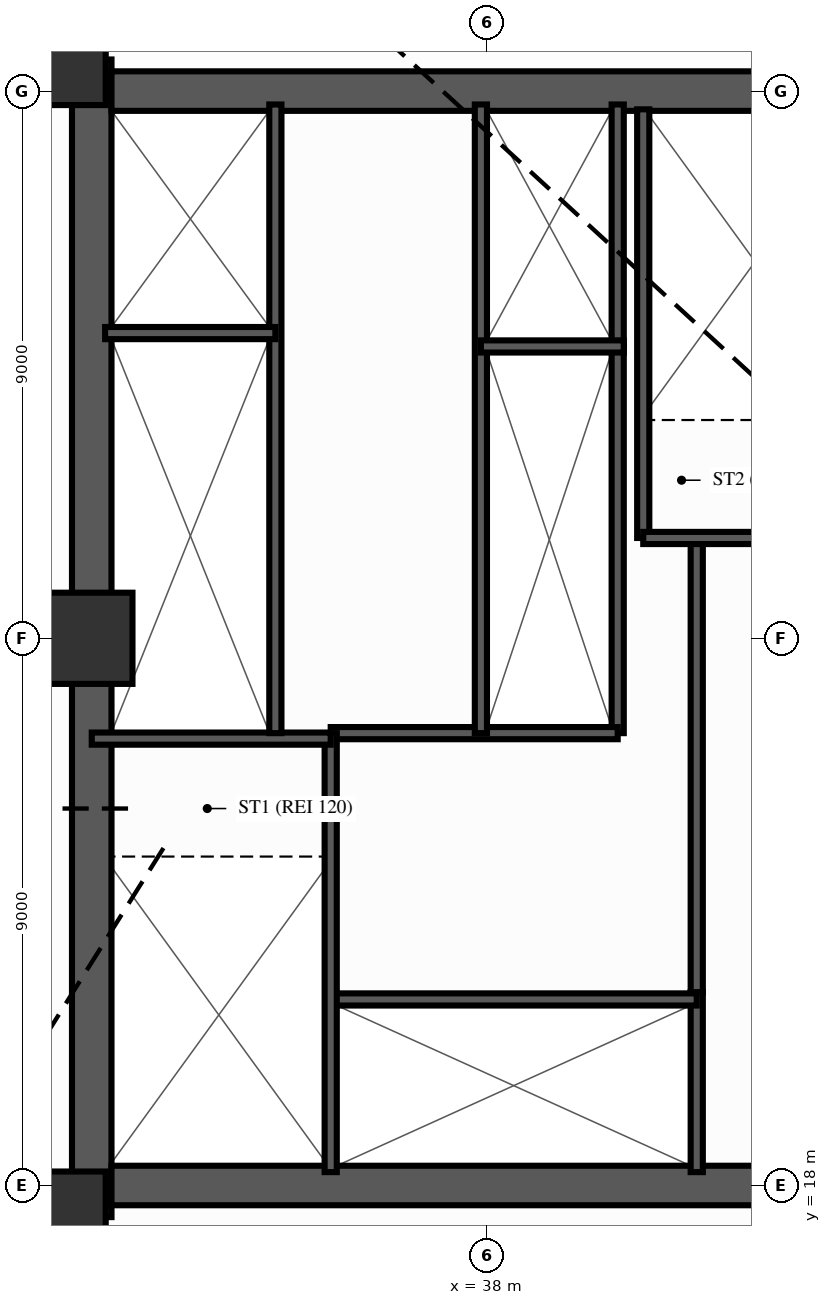
"""IFC4 building model, lengths in metres.
Left out: names, types, materials, properties, quantities, classifications, styles, units other than length and angle.
Written with IfcOpenShell. Run it as: python <this file> out.ifc"""

import sys

from ifc_helpers import new_model, si_unit, direction, frame, frame_2d, origin, origin_2d, place, context, subcontext, project, spatial, rectangle, extrude, source, transform, mapped, element, fill, save


model = new_model("IFC4")
c1 = context("Model", 3, precision=1e-05, world=origin(), true_north=direction((0.0, 1.0)))
c2 = subcontext(c1, "Body", "Model", "MODEL_VIEW")
j1 = project(units=[si_unit("LENGTHUNIT", "METRE"), si_unit("PLANEANGLEUNIT", "RADIAN")], contexts=[c1])
p1 = place(None, origin())
s1 = spatial("IfcSite", under=j1, at=p1, CompositionType="ELEMENT")
p2 = place(p1, origin())
s2 = spatial("IfcBuilding", under=s1, at=p2, CompositionType="ELEMENT")
p3 = place(p2, origin())
s3 = spatial("IfcBuildingStorey", under=s2, at=p3, CompositionType="ELEMENT", Elevation=0.0)
p4 = place(p3, frame((31.5, 17.48, 0.0), z_axis=(0.0, 0.0, 1.0), x_axis=(0.0, 1.0, 0.0)))
e1 = element("IfcWall", 1, at=p4, inside=s3, PredefinedType="SHEAR", context=c2, shape_type="SweptSolid", body=[
    extrude(rectangle(XDim=19.04, YDim=0.65, at=frame_2d((9.52, 0.0))), origin(), (0.0, 0.0, 1.0), 4.2),
])
p5 = place(p4, frame((6.32, 0.0, 0.0)))
e2 = element("IfcOpeningElement", 2, at=p5, cuts=e1, PredefinedType="OPENING", context=c2, shape_type="SweptSolid", body=[
    extrude(rectangle(XDim=1.1, YDim=2.15, at=frame_2d((0.55, 1.075))), frame((0.0, 0.337, 0.0), z_axis=(0.0, -1.0, 0.0), x_axis=(1.0, 0.0, 0.0)), (0.0, 0.0, 1.0), 0.674),
])
p6 = place(p3, frame((31.825, 18.0, 0.0), z_axis=(0.0, 0.0, 1.0), x_axis=(1.0, 0.0, 0.0)))
e3 = element("IfcWall", 3, at=p6, inside=s3, PredefinedType="SHEAR", context=c2, shape_type="SweptSolid", body=[
    extrude(rectangle(XDim=12.35, YDim=0.65, at=frame_2d((6.175, 0.0))), origin(), (0.0, 0.0, 1.0), 4.2),
])
p7 = place(p3, frame((31.825, 36.0, 0.0), z_axis=(0.0, 0.0, 1.0), x_axis=(1.0, 0.0, 0.0)))
e4 = element("IfcWall", 4, at=p7, inside=s3, PredefinedType="SHEAR", context=c2, shape_type="SweptSolid", body=[
    extrude(rectangle(XDim=12.35, YDim=0.65, at=frame_2d((6.175, 0.0))), origin(), (0.0, 0.0, 1.0), 4.2),
])
p8 = place(p7, frame((5.125, 0.0, 0.0), z_axis=(0.0, 0.0, 1.0), x_axis=(-1.0, 0.0, 0.0)))
e5 = element("IfcOpeningElement", 5, at=p8, cuts=e4, PredefinedType="OPENING", context=c2, shape_type="SweptSolid", body=[
    extrude(rectangle(XDim=1.4, YDim=2.15, at=frame_2d((0.7, 1.075))), frame((0.0, 0.337, 0.0), z_axis=(0.0, -1.0, 0.0), x_axis=(1.0, 0.0, 0.0)), (0.0, 0.0, 1.0), 0.674),
])
m1 = source(origin(), c2, "Body", "SweptSolid", [
    extrude(rectangle(XDim=1.5, YDim=1.5, at=origin_2d()), origin(), (0.0, 0.0, 1.0), 4.2),
])
for number, where, z_axis, x_axis in (
    (6, (30.98, 17.48, 0.0), (0.0, 0.0, 1.0), (1.0, 0.0, 0.0)),
    (7, (30.98, 36.52, 0.0), (0.0, 0.0, 1.0), (1.0, 0.0, 0.0)),
    (8, (31.42, 27.0, 0.0), (0.0, 0.0, 1.0), (1.0, 0.0, 0.0)),
):
    element("IfcColumn", number, at=place(p3, frame(where, z_axis=z_axis, x_axis=x_axis)), inside=s3, PredefinedType="COLUMN", context=c2, shape_type="MappedRepresentation", body=[
        mapped(m1, transform((0.0, 0.0, 0.0), scale=1.0)),
    ])
p9 = place(p3, frame((41.45, 18.22, 0.0), z_axis=(0.0, 0.0, 1.0), x_axis=(0.0, 1.0, 0.0)))
e9 = element("IfcWall", 9, at=p9, inside=s3, PredefinedType="PARTITIONING", context=c2, shape_type="SweptSolid", body=[
    extrude(rectangle(XDim=2.96, YDim=0.2, at=frame_2d((1.48, 0.0))), origin(), (0.0, 0.0, 1.0), 3.92),
])
p10 = place(p3, frame((41.45, 21.18, 0.0), z_axis=(0.0, 0.0, 1.0), x_axis=(0.0, 1.0, 0.0)))
e10 = element("IfcWall", 10, at=p10, inside=s3, PredefinedType="PARTITIONING", context=c2, shape_type="SweptSolid", body=[
    extrude(rectangle(XDim=7.42, YDim=0.2, at=frame_2d((3.71, 0.0))), origin(), (0.0, 0.0, 1.0), 3.92),
])
p11 = place(p10, frame((2.6, 0.0, 0.0)))
e11 = element("IfcOpeningElement", 11, at=p11, cuts=e10, PredefinedType="OPENING", context=c2, shape_type="SweptSolid", body=[
    extrude(rectangle(XDim=0.9, YDim=2.1, at=frame_2d((0.45, 1.05))), frame((0.0, 0.112, 0.0), z_axis=(0.0, -1.0, 0.0), x_axis=(1.0, 0.0, 0.0)), (0.0, 0.0, 1.0), 0.224),
])
p12 = place(p3, frame((40.15, 25.44, 0.0), z_axis=(0.0, 0.0, 1.0), x_axis=(0.0, 1.0, 0.0)))
e12 = element("IfcWall", 12, at=p12, inside=s3, PredefinedType="PARTITIONING", context=c2, shape_type="SweptSolid", body=[
    extrude(rectangle(XDim=6.36, YDim=0.2, at=frame_2d((3.18, 0.0))), origin(), (0.0, 0.0, 1.0), 3.92),
])
p13 = place(p3, frame((40.15, 31.8, 0.0), z_axis=(0.0, 0.0, 1.0), x_axis=(0.0, 1.0, 0.0)))
e13 = element("IfcWall", 13, at=p13, inside=s3, PredefinedType="PARTITIONING", context=c2, shape_type="SweptSolid", body=[
    extrude(rectangle(XDim=3.98, YDim=0.2, at=frame_2d((1.99, 0.0))), origin(), (0.0, 0.0, 1.0), 3.92),
])
p14 = place(p3, frame((35.43, 21.06, 0.0), z_axis=(0.0, 0.0, 1.0), x_axis=(1.0, 0.0, 0.0)))
e14 = element("IfcWall", 14, at=p14, inside=s3, PredefinedType="PARTITIONING", context=c2, shape_type="SweptSolid", body=[
    extrude(rectangle(XDim=6.02, YDim=0.2, at=frame_2d((3.01, 0.0))), origin(), (0.0, 0.0, 1.0), 3.92),
])
p15 = place(p14, frame((1.0, 0.0, 0.0)))
e15 = element("IfcOpeningElement", 15, at=p15, cuts=e14, PredefinedType="OPENING", context=c2, shape_type="SweptSolid", body=[
    extrude(rectangle(XDim=1.1, YDim=2.15, at=frame_2d((0.55, 1.075))), frame((0.0, 0.112, 0.0), z_axis=(0.0, -1.0, 0.0), x_axis=(1.0, 0.0, 0.0)), (0.0, 0.0, 1.0), 0.224),
])
p16 = place(p14, frame((2.95, 0.0, 0.0)))
e16 = element("IfcOpeningElement", 16, at=p16, cuts=e14, PredefinedType="OPENING", context=c2, shape_type="SweptSolid", body=[
    extrude(rectangle(XDim=1.1, YDim=2.15, at=frame_2d((0.55, 1.075))), frame((0.0, 0.112, 0.0), z_axis=(0.0, -1.0, 0.0), x_axis=(1.0, 0.0, 0.0)), (0.0, 0.0, 1.0), 0.224),
])
p17 = place(p14, frame((4.58, 0.0, 0.0)))
e17 = element("IfcOpeningElement", 17, at=p17, cuts=e14, PredefinedType="OPENING", context=c2, shape_type="SweptSolid", body=[
    extrude(rectangle(XDim=1.2, YDim=2.15, at=frame_2d((0.6, 1.075))), frame((0.0, 0.112, 0.0), z_axis=(0.0, -1.0, 0.0), x_axis=(1.0, 0.0, 0.0)), (0.0, 0.0, 1.0), 0.224),
])
p18 = place(p3, frame((35.43, 25.44, 0.0), z_axis=(0.0, 0.0, 1.0), x_axis=(1.0, 0.0, 0.0)))
e18 = element("IfcWall", 18, at=p18, inside=s3, PredefinedType="PARTITIONING", context=c2, shape_type="SweptSolid", body=[
    extrude(rectangle(XDim=4.72, YDim=0.2, at=frame_2d((2.36, 0.0))), origin(), (0.0, 0.0, 1.0), 3.92),
])
p19 = place(p18, frame((1.25, 0.0, 0.0)))
e19 = element("IfcOpeningElement", 19, at=p19, cuts=e18, PredefinedType="OPENING", context=c2, shape_type="SweptSolid", body=[
    extrude(rectangle(XDim=1.1, YDim=2.15, at=frame_2d((0.55, 1.075))), frame((0.0, 0.112, 0.0), z_axis=(0.0, -1.0, 0.0), x_axis=(1.0, 0.0, 0.0)), (0.0, 0.0, 1.0), 0.224),
])
p20 = place(p3, frame((35.43, 18.22, 0.0), z_axis=(0.0, 0.0, 1.0), x_axis=(0.0, 1.0, 0.0)))
e20 = element("IfcWall", 20, at=p20, inside=s3, PredefinedType="SOLIDWALL", context=c2, shape_type="SweptSolid", body=[
    extrude(rectangle(XDim=7.22, YDim=0.2, at=frame_2d((3.61, 0.0))), origin(), (0.0, 0.0, 1.0), 3.92),
])
p21 = place(p20, frame((6.68, 0.0, 0.0), z_axis=(0.0, 0.0, 1.0), x_axis=(-1.0, 0.0, 0.0)))
e21 = element("IfcOpeningElement", 21, at=p21, cuts=e20, PredefinedType="OPENING", context=c2, shape_type="SweptSolid", body=[
    extrude(rectangle(XDim=1.1, YDim=2.15, at=frame_2d((0.55, 1.075))), frame((0.0, 0.112, 0.0), z_axis=(0.0, -1.0, 0.0), x_axis=(1.0, 0.0, 0.0)), (0.0, 0.0, 1.0), 0.224),
])
p22 = place(p3, frame((31.5, 25.35, 0.0), z_axis=(0.0, 0.0, 1.0), x_axis=(1.0, 0.0, 0.0)))
e22 = element("IfcWall", 22, at=p22, inside=s3, PredefinedType="SOLIDWALL", context=c2, shape_type="SweptSolid", body=[
    extrude(rectangle(XDim=3.93, YDim=0.2, at=frame_2d((1.965, 0.0))), origin(), (0.0, 0.0, 1.0), 3.92),
])
p23 = place(p3, frame((40.57, 28.65, 0.0), z_axis=(0.0, 0.0, 1.0), x_axis=(0.0, 1.0, 0.0)))
e23 = element("IfcWall", 23, at=p23, inside=s3, PredefinedType="SOLIDWALL", context=c2, shape_type="SweptSolid", body=[
    extrude(rectangle(XDim=7.05, YDim=0.2, at=frame_2d((3.525, 0.0))), origin(), (0.0, 0.0, 1.0), 3.92),
])
p24 = place(p3, frame((40.57, 28.65, 0.0), z_axis=(0.0, 0.0, 1.0), x_axis=(1.0, 0.0, 0.0)))
e24 = element("IfcWall", 24, at=p24, inside=s3, PredefinedType="SOLIDWALL", context=c2, shape_type="SweptSolid", body=[
    extrude(rectangle(XDim=3.93, YDim=0.2, at=frame_2d((1.965, 0.0))), origin(), (0.0, 0.0, 1.0), 3.92),
])
p25 = place(p3, frame((34.52, 25.44, 0.0), z_axis=(0.0, 0.0, 1.0), x_axis=(0.0, 1.0, 0.0)))
e25 = element("IfcWall", 25, at=p25, inside=s3, PredefinedType="PARTITIONING", context=c2, shape_type="SweptSolid", body=[
    extrude(rectangle(XDim=10.34, YDim=0.2, at=frame_2d((5.17, 0.0))), origin(), (0.0, 0.0, 1.0), 3.92),
])
p26 = place(p25, frame((0.32, 0.0, 0.0)))
e26 = element("IfcOpeningElement", 26, at=p26, cuts=e25, PredefinedType="OPENING", context=c2, shape_type="SweptSolid", body=[
    extrude(rectangle(XDim=1.0, YDim=2.15, at=frame_2d((0.5, 1.075))), frame((0.0, 0.112, 0.0), z_axis=(0.0, -1.0, 0.0), x_axis=(1.0, 0.0, 0.0)), (0.0, 0.0, 1.0), 0.224),
])
p27 = place(p25, frame((1.71, 0.0, 0.0)))
e27 = element("IfcOpeningElement", 27, at=p27, cuts=e25, PredefinedType="OPENING", context=c2, shape_type="SweptSolid", body=[
    extrude(rectangle(XDim=1.0, YDim=2.15, at=frame_2d((0.5, 1.075))), frame((0.0, 0.112, 0.0), z_axis=(0.0, -1.0, 0.0), x_axis=(1.0, 0.0, 0.0)), (0.0, 0.0, 1.0), 0.224),
])
p28 = place(p25, frame((3.535, 0.0, 0.0)))
e28 = element("IfcOpeningElement", 28, at=p28, cuts=e25, PredefinedType="OPENING", context=c2, shape_type="SweptSolid", body=[
    extrude(rectangle(XDim=1.0, YDim=2.15, at=frame_2d((0.5, 1.075))), frame((0.0, 0.112, 0.0), z_axis=(0.0, -1.0, 0.0), x_axis=(1.0, 0.0, 0.0)), (0.0, 0.0, 1.0), 0.224),
])
p29 = place(p25, frame((5.135, 0.0, 0.0)))
e29 = element("IfcOpeningElement", 29, at=p29, cuts=e25, PredefinedType="OPENING", context=c2, shape_type="SweptSolid", body=[
    extrude(rectangle(XDim=1.0, YDim=2.15, at=frame_2d((0.5, 1.075))), frame((0.0, 0.112, 0.0), z_axis=(0.0, -1.0, 0.0), x_axis=(1.0, 0.0, 0.0)), (0.0, 0.0, 1.0), 0.224),
])
p30 = place(p25, frame((7.01, 0.0, 0.0)))
e30 = element("IfcOpeningElement", 30, at=p30, cuts=e25, PredefinedType="OPENING", context=c2, shape_type="SweptSolid", body=[
    extrude(rectangle(XDim=1.0, YDim=2.15, at=frame_2d((0.5, 1.075))), frame((0.0, 0.112, 0.0), z_axis=(0.0, -1.0, 0.0), x_axis=(1.0, 0.0, 0.0)), (0.0, 0.0, 1.0), 0.224),
])
p31 = place(p25, frame((8.76, 0.0, 0.0)))
e31 = element("IfcOpeningElement", 31, at=p31, cuts=e25, PredefinedType="OPENING", context=c2, shape_type="SweptSolid", body=[
    extrude(rectangle(XDim=1.0, YDim=2.15, at=frame_2d((0.5, 1.075))), frame((0.0, 0.112, 0.0), z_axis=(0.0, -1.0, 0.0), x_axis=(1.0, 0.0, 0.0)), (0.0, 0.0, 1.0), 0.224),
])
p32 = place(p3, frame((31.72, 32.02, 0.0), z_axis=(0.0, 0.0, 1.0), x_axis=(1.0, 0.0, 0.0)))
e32 = element("IfcWall", 32, at=p32, inside=s3, PredefinedType="PARTITIONING", context=c2, shape_type="SweptSolid", body=[
    extrude(rectangle(XDim=2.8, YDim=0.2, at=frame_2d((1.4, 0.0))), origin(), (0.0, 0.0, 1.0), 3.92),
])
p33 = place(p3, frame((37.9, 25.44, 0.0), z_axis=(0.0, 0.0, 1.0), x_axis=(0.0, 1.0, 0.0)))
e33 = element("IfcWall", 33, at=p33, inside=s3, PredefinedType="PARTITIONING", context=c2, shape_type="SweptSolid", body=[
    extrude(rectangle(XDim=10.34, YDim=0.2, at=frame_2d((5.17, 0.0))), origin(), (0.0, 0.0, 1.0), 3.92),
])
p34 = place(p33, frame((0.32, 0.0, 0.0)))
e34 = element("IfcOpeningElement", 34, at=p34, cuts=e33, PredefinedType="OPENING", context=c2, shape_type="SweptSolid", body=[
    extrude(rectangle(XDim=1.0, YDim=2.15, at=frame_2d((0.5, 1.075))), frame((0.0, 0.112, 0.0), z_axis=(0.0, -1.0, 0.0), x_axis=(1.0, 0.0, 0.0)), (0.0, 0.0, 1.0), 0.224),
])
p35 = place(p33, frame((1.71, 0.0, 0.0)))
e35 = element("IfcOpeningElement", 35, at=p35, cuts=e33, PredefinedType="OPENING", context=c2, shape_type="SweptSolid", body=[
    extrude(rectangle(XDim=1.0, YDim=2.15, at=frame_2d((0.5, 1.075))), frame((0.0, 0.112, 0.0), z_axis=(0.0, -1.0, 0.0), x_axis=(1.0, 0.0, 0.0)), (0.0, 0.0, 1.0), 0.224),
])
p36 = place(p33, frame((3.51, 0.0, 0.0)))
e36 = element("IfcOpeningElement", 36, at=p36, cuts=e33, PredefinedType="OPENING", context=c2, shape_type="SweptSolid", body=[
    extrude(rectangle(XDim=1.0, YDim=2.15, at=frame_2d((0.5, 1.075))), frame((0.0, 0.112, 0.0), z_axis=(0.0, -1.0, 0.0), x_axis=(1.0, 0.0, 0.0)), (0.0, 0.0, 1.0), 0.224),
])
p37 = place(p33, frame((5.01, 0.0, 0.0)))
e37 = element("IfcOpeningElement", 37, at=p37, cuts=e33, PredefinedType="OPENING", context=c2, shape_type="SweptSolid", body=[
    extrude(rectangle(XDim=1.0, YDim=2.15, at=frame_2d((0.5, 1.075))), frame((0.0, 0.112, 0.0), z_axis=(0.0, -1.0, 0.0), x_axis=(1.0, 0.0, 0.0)), (0.0, 0.0, 1.0), 0.224),
])
p38 = place(p33, frame((6.86, 0.0, 0.0)))
e38 = element("IfcOpeningElement", 38, at=p38, cuts=e33, PredefinedType="OPENING", context=c2, shape_type="SweptSolid", body=[
    extrude(rectangle(XDim=1.0, YDim=2.15, at=frame_2d((0.5, 1.075))), frame((0.0, 0.112, 0.0), z_axis=(0.0, -1.0, 0.0), x_axis=(1.0, 0.0, 0.0)), (0.0, 0.0, 1.0), 0.224),
])
p39 = place(p33, frame((8.71, 0.0, 0.0)))
e39 = element("IfcOpeningElement", 39, at=p39, cuts=e33, PredefinedType="OPENING", context=c2, shape_type="SweptSolid", body=[
    extrude(rectangle(XDim=1.0, YDim=2.15, at=frame_2d((0.5, 1.075))), frame((0.0, 0.112, 0.0), z_axis=(0.0, -1.0, 0.0), x_axis=(1.0, 0.0, 0.0)), (0.0, 0.0, 1.0), 0.224),
])
p40 = place(p3, frame((37.9, 31.8, 0.0), z_axis=(0.0, 0.0, 1.0), x_axis=(1.0, 0.0, 0.0)))
e40 = element("IfcWall", 40, at=p40, inside=s3, PredefinedType="PARTITIONING", context=c2, shape_type="SweptSolid", body=[
    extrude(rectangle(XDim=2.35, YDim=0.2, at=frame_2d((1.175, 0.0))), origin(), (0.0, 0.0, 1.0), 3.92),
])
m2 = source(origin(), c2, "Body", "SweptSolid", [
    extrude(rectangle(XDim=1.1, YDim=2.15, at=frame_2d((0.55, 1.075))), frame((0.0, 0.025, 0.0), z_axis=(0.0, -1.0, 0.0), x_axis=(1.0, 0.0, 0.0)), (0.0, 0.0, 1.0), 0.05),
])
p41 = place(p5, origin())
e41 = element("IfcDoor", 41, at=p41, inside=s3, OperationType="SINGLE_SWING_LEFT", PredefinedType="DOOR", context=c2, shape_type="MappedRepresentation", body=[
    mapped(m2, transform((0.0, 0.0, 0.0), scale=1.0)),
])
fill(e2, e41)
m3 = source(origin(), c2, "Body", "SweptSolid", [
    extrude(rectangle(XDim=1.4, YDim=2.15, at=frame_2d((0.7, 1.075))), frame((0.0, 0.025, 0.0), z_axis=(0.0, -1.0, 0.0), x_axis=(1.0, 0.0, 0.0)), (0.0, 0.0, 1.0), 0.05),
])
p42 = place(p8, origin())
e42 = element("IfcDoor", 42, at=p42, inside=s3, OperationType="SINGLE_SWING_RIGHT", PredefinedType="DOOR", context=c2, shape_type="MappedRepresentation", body=[
    mapped(m3, transform((0.0, 0.0, 0.0), scale=1.0)),
])
fill(e5, e42)
m4 = source(origin(), c2, "Body", "SweptSolid", [
    extrude(rectangle(XDim=0.9, YDim=2.1, at=frame_2d((0.45, 1.05))), frame((0.0, 0.025, 0.0), z_axis=(0.0, -1.0, 0.0), x_axis=(1.0, 0.0, 0.0)), (0.0, 0.0, 1.0), 0.05),
])
p43 = place(p11, origin())
e43 = element("IfcDoor", 43, at=p43, inside=s3, OperationType="SINGLE_SWING_LEFT", PredefinedType="DOOR", context=c2, shape_type="MappedRepresentation", body=[
    mapped(m4, transform((0.0, 0.0, 0.0), scale=1.0)),
])
fill(e11, e43)
p44 = place(p15, origin())
e44 = element("IfcDoor", 44, at=p44, inside=s3, OperationType="DOUBLE_DOOR_SLIDING", PredefinedType="DOOR", context=c2, shape_type="MappedRepresentation", body=[
    mapped(m2, transform((0.0, 0.0, 0.0), scale=1.0)),
])
fill(e15, e44)
p45 = place(p16, origin())
e45 = element("IfcDoor", 45, at=p45, inside=s3, OperationType="DOUBLE_DOOR_SLIDING", PredefinedType="DOOR", context=c2, shape_type="MappedRepresentation", body=[
    mapped(m2, transform((0.0, 0.0, 0.0), scale=1.0)),
])
fill(e16, e45)
m5 = source(origin(), c2, "Body", "SweptSolid", [
    extrude(rectangle(XDim=1.2, YDim=2.15, at=frame_2d((0.6, 1.075))), frame((0.0, 0.025, 0.0), z_axis=(0.0, -1.0, 0.0), x_axis=(1.0, 0.0, 0.0)), (0.0, 0.0, 1.0), 0.05),
])
p46 = place(p17, origin())
e46 = element("IfcDoor", 46, at=p46, inside=s3, OperationType="DOUBLE_DOOR_SLIDING", PredefinedType="DOOR", context=c2, shape_type="MappedRepresentation", body=[
    mapped(m5, transform((0.0, 0.0, 0.0), scale=1.0)),
])
fill(e17, e46)
p47 = place(p19, origin())
e47 = element("IfcDoor", 47, at=p47, inside=s3, OperationType="SINGLE_SWING_RIGHT", PredefinedType="DOOR", context=c2, shape_type="MappedRepresentation", body=[
    mapped(m2, transform((0.0, 0.0, 0.0), scale=1.0)),
])
fill(e19, e47)
p48 = place(p21, origin())
e48 = element("IfcDoor", 48, at=p48, inside=s3, OperationType="SINGLE_SWING_LEFT", PredefinedType="DOOR", context=c2, shape_type="MappedRepresentation", body=[
    mapped(m2, transform((0.0, 0.0, 0.0), scale=1.0)),
])
fill(e21, e48)
m6 = source(origin(), c2, "Body", "SweptSolid", [
    extrude(rectangle(XDim=1.0, YDim=2.15, at=frame_2d((0.5, 1.075))), frame((0.0, 0.025, 0.0), z_axis=(0.0, -1.0, 0.0), x_axis=(1.0, 0.0, 0.0)), (0.0, 0.0, 1.0), 0.05),
])
p49 = place(p26, origin())
e49 = element("IfcDoor", 49, at=p49, inside=s3, OperationType="DOUBLE_DOOR_SLIDING", PredefinedType="DOOR", context=c2, shape_type="MappedRepresentation", body=[
    mapped(m6, transform((0.0, 0.0, 0.0), scale=1.0)),
])
fill(e26, e49)
p50 = place(p27, origin())
e50 = element("IfcDoor", 50, at=p50, inside=s3, OperationType="DOUBLE_DOOR_SLIDING", PredefinedType="DOOR", context=c2, shape_type="MappedRepresentation", body=[
    mapped(m6, transform((0.0, 0.0, 0.0), scale=1.0)),
])
fill(e27, e50)
p51 = place(p28, origin())
e51 = element("IfcDoor", 51, at=p51, inside=s3, OperationType="DOUBLE_DOOR_SLIDING", PredefinedType="DOOR", context=c2, shape_type="MappedRepresentation", body=[
    mapped(m6, transform((0.0, 0.0, 0.0), scale=1.0)),
])
fill(e28, e51)
p52 = place(p29, origin())
e52 = element("IfcDoor", 52, at=p52, inside=s3, OperationType="DOUBLE_DOOR_SLIDING", PredefinedType="DOOR", context=c2, shape_type="MappedRepresentation", body=[
    mapped(m6, transform((0.0, 0.0, 0.0), scale=1.0)),
])
fill(e29, e52)
p53 = place(p30, origin())
e53 = element("IfcDoor", 53, at=p53, inside=s3, OperationType="DOUBLE_DOOR_SLIDING", PredefinedType="DOOR", context=c2, shape_type="MappedRepresentation", body=[
    mapped(m6, transform((0.0, 0.0, 0.0), scale=1.0)),
])
fill(e30, e53)
p54 = place(p31, origin())
e54 = element("IfcDoor", 54, at=p54, inside=s3, OperationType="DOUBLE_DOOR_SLIDING", PredefinedType="DOOR", context=c2, shape_type="MappedRepresentation", body=[
    mapped(m6, transform((0.0, 0.0, 0.0), scale=1.0)),
])
fill(e31, e54)
p55 = place(p34, origin())
e55 = element("IfcDoor", 55, at=p55, inside=s3, OperationType="DOUBLE_DOOR_SLIDING", PredefinedType="DOOR", context=c2, shape_type="MappedRepresentation", body=[
    mapped(m6, transform((0.0, 0.0, 0.0), scale=1.0)),
])
fill(e34, e55)
p56 = place(p35, origin())
e56 = element("IfcDoor", 56, at=p56, inside=s3, OperationType="DOUBLE_DOOR_SLIDING", PredefinedType="DOOR", context=c2, shape_type="MappedRepresentation", body=[
    mapped(m6, transform((0.0, 0.0, 0.0), scale=1.0)),
])
fill(e35, e56)
p57 = place(p36, origin())
e57 = element("IfcDoor", 57, at=p57, inside=s3, OperationType="DOUBLE_DOOR_SLIDING", PredefinedType="DOOR", context=c2, shape_type="MappedRepresentation", body=[
    mapped(m6, transform((0.0, 0.0, 0.0), scale=1.0)),
])
fill(e36, e57)
p58 = place(p37, origin())
e58 = element("IfcDoor", 58, at=p58, inside=s3, OperationType="DOUBLE_DOOR_SLIDING", PredefinedType="DOOR", context=c2, shape_type="MappedRepresentation", body=[
    mapped(m6, transform((0.0, 0.0, 0.0), scale=1.0)),
])
fill(e37, e58)
p59 = place(p38, origin())
e59 = element("IfcDoor", 59, at=p59, inside=s3, OperationType="DOUBLE_DOOR_SLIDING", PredefinedType="DOOR", context=c2, shape_type="MappedRepresentation", body=[
    mapped(m6, transform((0.0, 0.0, 0.0), scale=1.0)),
])
fill(e38, e59)
p60 = place(p39, origin())
e60 = element("IfcDoor", 60, at=p60, inside=s3, OperationType="DOUBLE_DOOR_SLIDING", PredefinedType="DOOR", context=c2, shape_type="MappedRepresentation", body=[
    mapped(m6, transform((0.0, 0.0, 0.0), scale=1.0)),
])
fill(e39, e60)
save(model, sys.argv[1])
